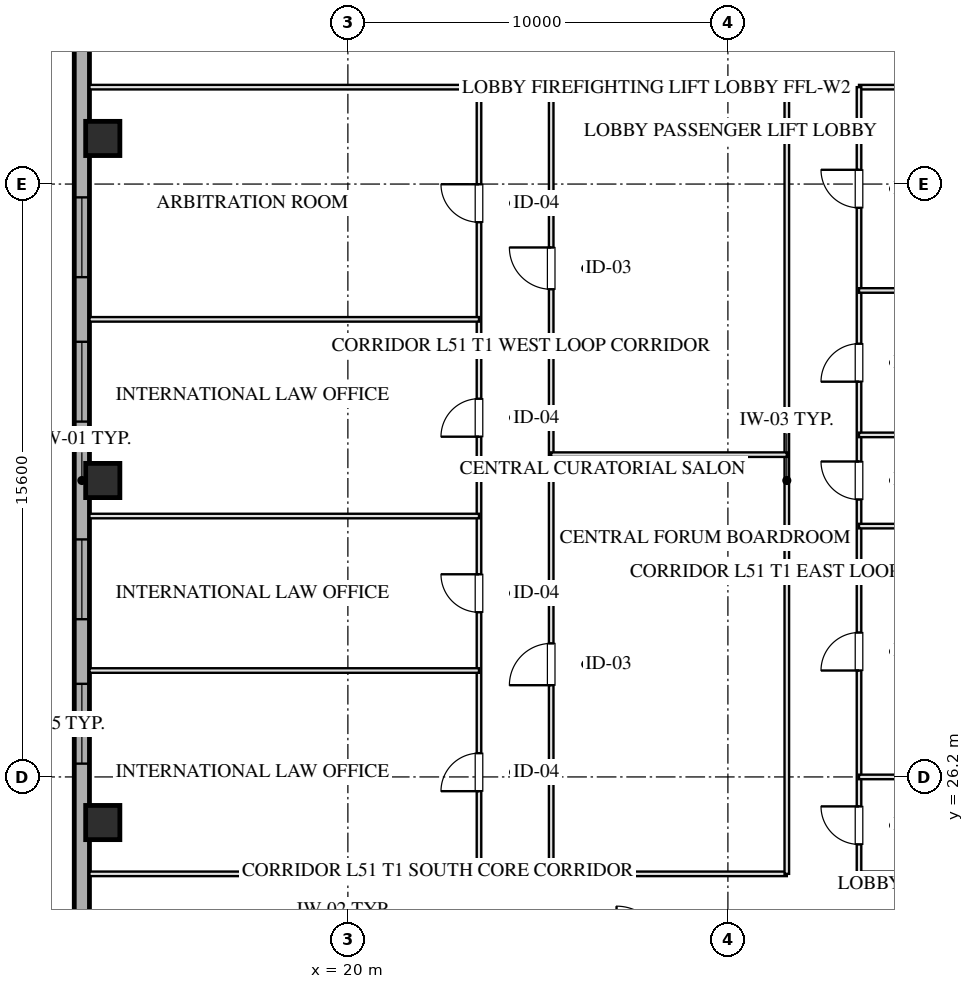
"""IFC4 building model, lengths in metres.
Left out: names, types, materials, properties, quantities, classifications, styles, units other than length and angle.
Written with IfcOpenShell. Run it as: python <this file> out.ifc"""

import sys

from ifc_helpers import new_model, si_unit, direction, frame, frame_2d, origin, origin_2d, place, context, subcontext, project, spatial, rectangle, hollow_rectangle, extrude, element, fill, save


model = new_model("IFC4")
c1 = context("Model", 3, precision=1e-05, world=origin(), true_north=direction((0.0, 1.0)))
c2 = subcontext(c1, "Body", "Model", "MODEL_VIEW")
j1 = project(units=[si_unit("LENGTHUNIT", "METRE"), si_unit("PLANEANGLEUNIT", "RADIAN")], contexts=[c1])
p1 = place(None, origin())
s1 = spatial("IfcSite", under=j1, at=p1, CompositionType="ELEMENT")
p2 = place(p1, origin())
s2 = spatial("IfcBuilding", under=s1, at=p2, CompositionType="ELEMENT")
p3 = place(p2, frame((0.0, 0.0, 192.05)))
s3 = spatial("IfcBuildingStorey", under=s2, at=p3, CompositionType="ELEMENT", Elevation=192.05)
for number, where, z_axis, x_axis in (
    (1, (13.55, 25.0, 0.0), (0.0, 0.0, 1.0), (1.0, 0.0, 0.0)),
    (2, (13.55, 34.0, 0.0), (0.0, 0.0, 1.0), (1.0, 0.0, 0.0)),
    (3, (13.55, 43.0, 0.0), (0.0, 0.0, 1.0), (1.0, 0.0, 0.0)),
):
    element("IfcColumn", number, at=place(p3, frame(where, z_axis=z_axis, x_axis=x_axis)), inside=s3, PredefinedType="COLUMN", context=c2, shape_type="SweptSolid", body=[
        extrude(hollow_rectangle(XDim=0.9, YDim=0.9, WallThickness=0.032, at=origin_2d()), origin(), (0.0, 0.0, 1.0), 3.451),
    ])
p4 = place(p3, frame((13.0, 10.8, 0.0), z_axis=(0.0, 0.0, 1.0), x_axis=(0.0, 1.0, 0.0)))
e4 = element("IfcWall", 4, at=p4, inside=s3, PredefinedType="SOLIDWALL", context=c2, shape_type="SweptSolid", body=[
    extrude(rectangle(XDim=46.4, YDim=0.4, at=frame_2d((23.2, 0.0))), origin(), (0.0, 0.0, 1.0), 2.61),
])
p5 = place(p4, frame((15.75, 0.0, 0.75)))
e5 = element("IfcOpeningElement", 5, at=p5, cuts=e4, PredefinedType="OPENING", context=c2, shape_type="SweptSolid", body=[
    extrude(rectangle(XDim=2.1, YDim=1.46, at=frame_2d((1.05, 0.73))), frame((0.0, 0.21, 0.0), z_axis=(0.0, -1.0, 0.0), x_axis=(1.0, 0.0, 0.0)), (0.0, 0.0, 1.0), 0.42),
])
p6 = place(p4, frame((19.55, 0.0, 0.75)))
e6 = element("IfcOpeningElement", 6, at=p6, cuts=e4, PredefinedType="OPENING", context=c2, shape_type="SweptSolid", body=[
    extrude(rectangle(XDim=2.1, YDim=1.46, at=frame_2d((1.05, 0.73))), frame((0.0, 0.21, 0.0), z_axis=(0.0, -1.0, 0.0), x_axis=(1.0, 0.0, 0.0)), (0.0, 0.0, 1.0), 0.42),
])
p7 = place(p4, frame((24.75, 0.0, 0.75)))
e7 = element("IfcOpeningElement", 7, at=p7, cuts=e4, PredefinedType="OPENING", context=c2, shape_type="SweptSolid", body=[
    extrude(rectangle(XDim=2.1, YDim=1.46, at=frame_2d((1.05, 0.73))), frame((0.0, 0.21, 0.0), z_axis=(0.0, -1.0, 0.0), x_axis=(1.0, 0.0, 0.0)), (0.0, 0.0, 1.0), 0.42),
])
p8 = place(p4, frame((28.55, 0.0, 0.75)))
e8 = element("IfcOpeningElement", 8, at=p8, cuts=e4, PredefinedType="OPENING", context=c2, shape_type="SweptSolid", body=[
    extrude(rectangle(XDim=2.1, YDim=1.46, at=frame_2d((1.05, 0.73))), frame((0.0, 0.21, 0.0), z_axis=(0.0, -1.0, 0.0), x_axis=(1.0, 0.0, 0.0)), (0.0, 0.0, 1.0), 0.42),
])
p9 = place(p3, frame((13.2, 23.65, 0.0), z_axis=(0.0, 0.0, 1.0), x_axis=(1.0, 0.0, 0.0)))
e9 = element("IfcWall", 9, at=p9, inside=s3, PredefinedType="PARTITIONING", context=c2, shape_type="SweptSolid", body=[
    extrude(rectangle(XDim=10.25, YDim=0.12, at=frame_2d((5.125, 0.0))), origin(), (0.0, 0.0, 1.0), 3.175),
])
p10 = place(p3, frame((25.35, 23.65, 0.0), z_axis=(0.0, 0.0, 1.0), x_axis=(1.0, 0.0, 0.0)))
e10 = element("IfcWall", 10, at=p10, inside=s3, PredefinedType="PARTITIONING", context=c2, shape_type="SweptSolid", body=[
    extrude(rectangle(XDim=6.2, YDim=0.12, at=frame_2d((3.1, 0.0))), origin(), (0.0, 0.0, 1.0), 3.175),
])
p11 = place(p3, frame((33.45, 23.65, 0.0), z_axis=(0.0, 0.0, 1.0), x_axis=(1.0, 0.0, 0.0)))
e11 = element("IfcWall", 11, at=p11, inside=s3, PredefinedType="PARTITIONING", context=c2, shape_type="SweptSolid", body=[
    extrude(rectangle(XDim=13.35, YDim=0.12, at=frame_2d((6.675, 0.0))), origin(), (0.0, 0.0, 1.0), 3.175),
])
p12 = place(p3, frame((13.2, 44.35, 0.0), z_axis=(0.0, 0.0, 1.0), x_axis=(1.0, 0.0, 0.0)))
e12 = element("IfcWall", 12, at=p12, inside=s3, PredefinedType="PARTITIONING", context=c2, shape_type="SweptSolid", body=[
    extrude(rectangle(XDim=10.25, YDim=0.12, at=frame_2d((5.125, 0.0))), origin(), (0.0, 0.0, 1.0), 3.175),
])
p13 = place(p3, frame((25.35, 44.35, 0.0), z_axis=(0.0, 0.0, 1.0), x_axis=(1.0, 0.0, 0.0)))
e13 = element("IfcWall", 13, at=p13, inside=s3, PredefinedType="PARTITIONING", context=c2, shape_type="SweptSolid", body=[
    extrude(rectangle(XDim=6.2, YDim=0.12, at=frame_2d((3.1, 0.0))), origin(), (0.0, 0.0, 1.0), 3.175),
])
p14 = place(p3, frame((33.45, 44.35, 0.0), z_axis=(0.0, 0.0, 1.0), x_axis=(1.0, 0.0, 0.0)))
e14 = element("IfcWall", 14, at=p14, inside=s3, PredefinedType="PARTITIONING", context=c2, shape_type="SweptSolid", body=[
    extrude(rectangle(XDim=13.35, YDim=0.12, at=frame_2d((6.675, 0.0))), origin(), (0.0, 0.0, 1.0), 3.175),
])
p15 = place(p3, frame((23.45, 23.65, 0.0), z_axis=(0.0, 0.0, 1.0), x_axis=(0.0, 1.0, 0.0)))
e15 = element("IfcWall", 15, at=p15, inside=s3, PredefinedType="PARTITIONING", context=c2, shape_type="SweptSolid", body=[
    extrude(rectangle(XDim=20.7, YDim=0.12, at=frame_2d((10.35, 0.0))), origin(), (0.0, 0.0, 1.0), 3.175),
])
p16 = place(p15, frame((2.175, 0.0, 0.0)))
e16 = element("IfcOpeningElement", 16, at=p16, cuts=e15, PredefinedType="OPENING", context=c2, shape_type="SweptSolid", body=[
    extrude(rectangle(XDim=1.0, YDim=2.05, at=frame_2d((0.5, 1.025))), frame((0.0, 0.07, 0.0), z_axis=(0.0, -1.0, 0.0), x_axis=(1.0, 0.0, 0.0)), (0.0, 0.0, 1.0), 0.14),
])
p17 = place(p15, frame((6.883, 0.0, 0.0)))
e17 = element("IfcOpeningElement", 17, at=p17, cuts=e15, PredefinedType="OPENING", context=c2, shape_type="SweptSolid", body=[
    extrude(rectangle(XDim=1.0, YDim=2.05, at=frame_2d((0.5, 1.025))), frame((0.0, 0.07, 0.0), z_axis=(0.0, -1.0, 0.0), x_axis=(1.0, 0.0, 0.0)), (0.0, 0.0, 1.0), 0.14),
])
p18 = place(p15, frame((11.502, 0.0, 0.0)))
e18 = element("IfcOpeningElement", 18, at=p18, cuts=e15, PredefinedType="OPENING", context=c2, shape_type="SweptSolid", body=[
    extrude(rectangle(XDim=1.0, YDim=2.05, at=frame_2d((0.5, 1.025))), frame((0.0, 0.07, 0.0), z_axis=(0.0, -1.0, 0.0), x_axis=(1.0, 0.0, 0.0)), (0.0, 0.0, 1.0), 0.14),
])
p19 = place(p15, frame((17.145, 0.0, 0.0)))
e19 = element("IfcOpeningElement", 19, at=p19, cuts=e15, PredefinedType="OPENING", context=c2, shape_type="SweptSolid", body=[
    extrude(rectangle(XDim=1.0, YDim=2.05, at=frame_2d((0.5, 1.025))), frame((0.0, 0.07, 0.0), z_axis=(0.0, -1.0, 0.0), x_axis=(1.0, 0.0, 0.0)), (0.0, 0.0, 1.0), 0.14),
])
p20 = place(p3, frame((25.35, 23.65, 0.0), z_axis=(0.0, 0.0, 1.0), x_axis=(0.0, 1.0, 0.0)))
e20 = element("IfcWall", 20, at=p20, inside=s3, PredefinedType="PARTITIONING", context=c2, shape_type="SweptSolid", body=[
    extrude(rectangle(XDim=20.7, YDim=0.12, at=frame_2d((10.35, 0.0))), origin(), (0.0, 0.0, 1.0), 3.175),
])
p21 = place(p20, frame((4.963, 0.0, 0.0)))
e21 = element("IfcOpeningElement", 21, at=p21, cuts=e20, PredefinedType="OPENING", context=c2, shape_type="SweptSolid", body=[
    extrude(rectangle(XDim=1.1, YDim=2.05, at=frame_2d((0.55, 1.025))), frame((0.0, 0.07, 0.0), z_axis=(0.0, -1.0, 0.0), x_axis=(1.0, 0.0, 0.0)), (0.0, 0.0, 1.0), 0.14),
])
p22 = place(p20, frame((15.382, 0.0, 0.0)))
e22 = element("IfcOpeningElement", 22, at=p22, cuts=e20, PredefinedType="OPENING", context=c2, shape_type="SweptSolid", body=[
    extrude(rectangle(XDim=1.1, YDim=2.05, at=frame_2d((0.55, 1.025))), frame((0.0, 0.07, 0.0), z_axis=(0.0, -1.0, 0.0), x_axis=(1.0, 0.0, 0.0)), (0.0, 0.0, 1.0), 0.14),
])
p23 = place(p3, frame((31.55, 23.65, 0.0), z_axis=(0.0, 0.0, 1.0), x_axis=(0.0, 1.0, 0.0)))
e23 = element("IfcWall", 23, at=p23, inside=s3, PredefinedType="PARTITIONING", context=c2, shape_type="SweptSolid", body=[
    extrude(rectangle(XDim=20.7, YDim=0.12, at=frame_2d((10.35, 0.0))), origin(), (0.0, 0.0, 1.0), 3.175),
])
p24 = place(p3, frame((33.45, 23.65, 0.0), z_axis=(0.0, 0.0, 1.0), x_axis=(0.0, 1.0, 0.0)))
e24 = element("IfcWall", 24, at=p24, inside=s3, PredefinedType="PARTITIONING", context=c2, shape_type="SweptSolid", body=[
    extrude(rectangle(XDim=20.7, YDim=0.12, at=frame_2d((10.35, 0.0))), origin(), (0.0, 0.0, 1.0), 3.175),
])
p25 = place(p24, frame((0.775, 0.0, 0.0)))
e25 = element("IfcOpeningElement", 25, at=p25, cuts=e24, PredefinedType="OPENING", context=c2, shape_type="SweptSolid", body=[
    extrude(rectangle(XDim=1.0, YDim=2.05, at=frame_2d((0.5, 1.025))), frame((0.0, 0.07, 0.0), z_axis=(0.0, -1.0, 0.0), x_axis=(1.0, 0.0, 0.0)), (0.0, 0.0, 1.0), 0.14),
])
p26 = place(p24, frame((5.35, 0.0, 0.0)))
e26 = element("IfcOpeningElement", 26, at=p26, cuts=e24, PredefinedType="OPENING", context=c2, shape_type="SweptSolid", body=[
    extrude(rectangle(XDim=1.0, YDim=2.05, at=frame_2d((0.5, 1.025))), frame((0.0, 0.07, 0.0), z_axis=(0.0, -1.0, 0.0), x_axis=(1.0, 0.0, 0.0)), (0.0, 0.0, 1.0), 0.14),
])
p27 = place(p24, frame((9.85, 0.0, 0.0)))
e27 = element("IfcOpeningElement", 27, at=p27, cuts=e24, PredefinedType="OPENING", context=c2, shape_type="SweptSolid", body=[
    extrude(rectangle(XDim=1.0, YDim=2.05, at=frame_2d((0.5, 1.025))), frame((0.0, 0.07, 0.0), z_axis=(0.0, -1.0, 0.0), x_axis=(1.0, 0.0, 0.0)), (0.0, 0.0, 1.0), 0.14),
])
p28 = place(p24, frame((12.95, 0.0, 0.0)))
e28 = element("IfcOpeningElement", 28, at=p28, cuts=e24, PredefinedType="OPENING", context=c2, shape_type="SweptSolid", body=[
    extrude(rectangle(XDim=1.0, YDim=2.05, at=frame_2d((0.5, 1.025))), frame((0.0, 0.07, 0.0), z_axis=(0.0, -1.0, 0.0), x_axis=(1.0, 0.0, 0.0)), (0.0, 0.0, 1.0), 0.14),
])
p29 = place(p24, frame((17.525, 0.0, 0.0)))
e29 = element("IfcOpeningElement", 29, at=p29, cuts=e24, PredefinedType="OPENING", context=c2, shape_type="SweptSolid", body=[
    extrude(rectangle(XDim=1.0, YDim=2.05, at=frame_2d((0.5, 1.025))), frame((0.0, 0.07, 0.0), z_axis=(0.0, -1.0, 0.0), x_axis=(1.0, 0.0, 0.0)), (0.0, 0.0, 1.0), 0.14),
])
p30 = place(p3, frame((25.35, 34.68, 0.0), z_axis=(0.0, 0.0, 1.0), x_axis=(1.0, 0.0, 0.0)))
e30 = element("IfcWall", 30, at=p30, inside=s3, PredefinedType="PARTITIONING", context=c2, shape_type="SweptSolid", body=[
    extrude(rectangle(XDim=6.2, YDim=0.12, at=frame_2d((3.1, 0.0))), origin(), (0.0, 0.0, 1.0), 3.175),
])
for number, where, z_axis, x_axis in (
    (31, (13.2, 29.0, 0.0), (0.0, 0.0, 1.0), (1.0, 0.0, 0.0)),
    (32, (13.2, 33.065, 0.0), (0.0, 0.0, 1.0), (1.0, 0.0, 0.0)),
    (33, (13.2, 38.24, 0.0), (0.0, 0.0, 1.0), (1.0, 0.0, 0.0)),
):
    element("IfcWall", number, at=place(p3, frame(where, z_axis=z_axis, x_axis=x_axis)), inside=s3, PredefinedType="PARTITIONING", context=c2, shape_type="SweptSolid", body=[
        extrude(rectangle(XDim=10.25, YDim=0.12, at=frame_2d((5.125, 0.0))), origin(), (0.0, 0.0, 1.0), 3.175),
    ])
for number, where, z_axis, x_axis in (
    (34, (33.45, 26.2, 0.0), (0.0, 0.0, 1.0), (1.0, 0.0, 0.0)),
    (35, (33.45, 32.8, 0.0), (0.0, 0.0, 1.0), (1.0, 0.0, 0.0)),
    (36, (33.45, 35.2, 0.0), (0.0, 0.0, 1.0), (1.0, 0.0, 0.0)),
    (37, (33.45, 39.0, 0.0), (0.0, 0.0, 1.0), (1.0, 0.0, 0.0)),
):
    element("IfcWall", number, at=place(p3, frame(where, z_axis=z_axis, x_axis=x_axis)), inside=s3, PredefinedType="PARTITIONING", context=c2, shape_type="SweptSolid", body=[
        extrude(rectangle(XDim=13.35, YDim=0.12, at=frame_2d((6.675, 0.0))), origin(), (0.0, 0.0, 1.0), 3.175),
    ])
p31 = place(p5, origin())
e38 = element("IfcWindow", 38, at=p31, inside=s3, PartitioningType="TRIPLE_PANEL_VERTICAL", PredefinedType="WINDOW", context=c2, shape_type="SweptSolid", body=[
    extrude(rectangle(XDim=2.1, YDim=1.46, at=frame_2d((1.05, 0.73))), frame((0.0, 0.03, 0.0), z_axis=(0.0, -1.0, 0.0), x_axis=(1.0, 0.0, 0.0)), (0.0, 0.0, 1.0), 0.06),
])
fill(e5, e38)
p32 = place(p6, origin())
e39 = element("IfcWindow", 39, at=p32, inside=s3, PartitioningType="TRIPLE_PANEL_VERTICAL", PredefinedType="WINDOW", context=c2, shape_type="SweptSolid", body=[
    extrude(rectangle(XDim=2.1, YDim=1.46, at=frame_2d((1.05, 0.73))), frame((0.0, 0.03, 0.0), z_axis=(0.0, -1.0, 0.0), x_axis=(1.0, 0.0, 0.0)), (0.0, 0.0, 1.0), 0.06),
])
fill(e6, e39)
p33 = place(p7, origin())
e40 = element("IfcWindow", 40, at=p33, inside=s3, PartitioningType="TRIPLE_PANEL_VERTICAL", PredefinedType="WINDOW", context=c2, shape_type="SweptSolid", body=[
    extrude(rectangle(XDim=2.1, YDim=1.46, at=frame_2d((1.05, 0.73))), frame((0.0, 0.03, 0.0), z_axis=(0.0, -1.0, 0.0), x_axis=(1.0, 0.0, 0.0)), (0.0, 0.0, 1.0), 0.06),
])
fill(e7, e40)
p34 = place(p8, origin())
e41 = element("IfcWindow", 41, at=p34, inside=s3, PartitioningType="TRIPLE_PANEL_VERTICAL", PredefinedType="WINDOW", context=c2, shape_type="SweptSolid", body=[
    extrude(rectangle(XDim=2.1, YDim=1.46, at=frame_2d((1.05, 0.73))), frame((0.0, 0.03, 0.0), z_axis=(0.0, -1.0, 0.0), x_axis=(1.0, 0.0, 0.0)), (0.0, 0.0, 1.0), 0.06),
])
fill(e8, e41)
p35 = place(p16, origin())
e42 = element("IfcDoor", 42, at=p35, inside=s3, OperationType="SINGLE_SWING_LEFT", PredefinedType="DOOR", context=c2, shape_type="SweptSolid", body=[
    extrude(rectangle(XDim=1.0, YDim=2.05, at=frame_2d((0.5, 1.025))), frame((0.0, 0.025, 0.0), z_axis=(0.0, -1.0, 0.0), x_axis=(1.0, 0.0, 0.0)), (0.0, 0.0, 1.0), 0.05),
])
fill(e16, e42)
p36 = place(p17, origin())
e43 = element("IfcDoor", 43, at=p36, inside=s3, OperationType="SINGLE_SWING_RIGHT", PredefinedType="DOOR", context=c2, shape_type="SweptSolid", body=[
    extrude(rectangle(XDim=1.0, YDim=2.05, at=frame_2d((0.5, 1.025))), frame((0.0, 0.025, 0.0), z_axis=(0.0, -1.0, 0.0), x_axis=(1.0, 0.0, 0.0)), (0.0, 0.0, 1.0), 0.05),
])
fill(e17, e43)
p37 = place(p18, origin())
e44 = element("IfcDoor", 44, at=p37, inside=s3, OperationType="SINGLE_SWING_LEFT", PredefinedType="DOOR", context=c2, shape_type="SweptSolid", body=[
    extrude(rectangle(XDim=1.0, YDim=2.05, at=frame_2d((0.5, 1.025))), frame((0.0, 0.025, 0.0), z_axis=(0.0, -1.0, 0.0), x_axis=(1.0, 0.0, 0.0)), (0.0, 0.0, 1.0), 0.05),
])
fill(e18, e44)
p38 = place(p19, origin())
e45 = element("IfcDoor", 45, at=p38, inside=s3, OperationType="SINGLE_SWING_RIGHT", PredefinedType="DOOR", context=c2, shape_type="SweptSolid", body=[
    extrude(rectangle(XDim=1.0, YDim=2.05, at=frame_2d((0.5, 1.025))), frame((0.0, 0.025, 0.0), z_axis=(0.0, -1.0, 0.0), x_axis=(1.0, 0.0, 0.0)), (0.0, 0.0, 1.0), 0.05),
])
fill(e19, e45)
p39 = place(p21, origin())
e46 = element("IfcDoor", 46, at=p39, inside=s3, OperationType="SINGLE_SWING_LEFT", PredefinedType="DOOR", context=c2, shape_type="SweptSolid", body=[
    extrude(rectangle(XDim=1.1, YDim=2.05, at=frame_2d((0.55, 1.025))), frame((0.0, 0.025, 0.0), z_axis=(0.0, -1.0, 0.0), x_axis=(1.0, 0.0, 0.0)), (0.0, 0.0, 1.0), 0.05),
])
fill(e21, e46)
p40 = place(p22, origin())
e47 = element("IfcDoor", 47, at=p40, inside=s3, OperationType="SINGLE_SWING_RIGHT", PredefinedType="DOOR", context=c2, shape_type="SweptSolid", body=[
    extrude(rectangle(XDim=1.1, YDim=2.05, at=frame_2d((0.55, 1.025))), frame((0.0, 0.025, 0.0), z_axis=(0.0, -1.0, 0.0), x_axis=(1.0, 0.0, 0.0)), (0.0, 0.0, 1.0), 0.05),
])
fill(e22, e47)
p41 = place(p25, origin())
e48 = element("IfcDoor", 48, at=p41, inside=s3, OperationType="SINGLE_SWING_RIGHT", PredefinedType="DOOR", context=c2, shape_type="SweptSolid", body=[
    extrude(rectangle(XDim=1.0, YDim=2.05, at=frame_2d((0.5, 1.025))), frame((0.0, 0.025, 0.0), z_axis=(0.0, -1.0, 0.0), x_axis=(1.0, 0.0, 0.0)), (0.0, 0.0, 1.0), 0.05),
])
fill(e25, e48)
p42 = place(p26, origin())
e49 = element("IfcDoor", 49, at=p42, inside=s3, OperationType="SINGLE_SWING_LEFT", PredefinedType="DOOR", context=c2, shape_type="SweptSolid", body=[
    extrude(rectangle(XDim=1.0, YDim=2.05, at=frame_2d((0.5, 1.025))), frame((0.0, 0.025, 0.0), z_axis=(0.0, -1.0, 0.0), x_axis=(1.0, 0.0, 0.0)), (0.0, 0.0, 1.0), 0.05),
])
fill(e26, e49)
p43 = place(p27, origin())
e50 = element("IfcDoor", 50, at=p43, inside=s3, OperationType="SINGLE_SWING_RIGHT", PredefinedType="DOOR", context=c2, shape_type="SweptSolid", body=[
    extrude(rectangle(XDim=1.0, YDim=2.05, at=frame_2d((0.5, 1.025))), frame((0.0, 0.025, 0.0), z_axis=(0.0, -1.0, 0.0), x_axis=(1.0, 0.0, 0.0)), (0.0, 0.0, 1.0), 0.05),
])
fill(e27, e50)
p44 = place(p28, origin())
e51 = element("IfcDoor", 51, at=p44, inside=s3, OperationType="SINGLE_SWING_LEFT", PredefinedType="DOOR", context=c2, shape_type="SweptSolid", body=[
    extrude(rectangle(XDim=1.0, YDim=2.05, at=frame_2d((0.5, 1.025))), frame((0.0, 0.025, 0.0), z_axis=(0.0, -1.0, 0.0), x_axis=(1.0, 0.0, 0.0)), (0.0, 0.0, 1.0), 0.05),
])
fill(e28, e51)
p45 = place(p29, origin())
e52 = element("IfcDoor", 52, at=p45, inside=s3, OperationType="SINGLE_SWING_RIGHT", PredefinedType="DOOR", context=c2, shape_type="SweptSolid", body=[
    extrude(rectangle(XDim=1.0, YDim=2.05, at=frame_2d((0.5, 1.025))), frame((0.0, 0.025, 0.0), z_axis=(0.0, -1.0, 0.0), x_axis=(1.0, 0.0, 0.0)), (0.0, 0.0, 1.0), 0.05),
])
fill(e29, e52)
save(model, sys.argv[1])
